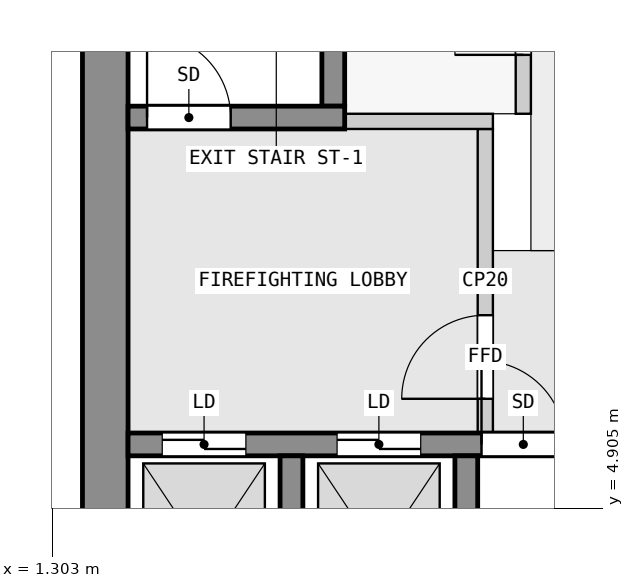
"""IFC4 building model, lengths in metres.
Left out: names, types, materials, properties, quantities, classifications, styles, units other than length and angle.
Written with IfcOpenShell. Run it as: python <this file> out.ifc"""

import sys

from ifc_helpers import new_model, si_unit, direction, frame, frame_2d, origin, place, context, subcontext, project, spatial, rectangle, extrude, element, fill, save


model = new_model("IFC4")
c1 = context("Model", 3, precision=1e-05, world=origin(), true_north=direction((0.0, 1.0)))
c2 = subcontext(c1, "Body", "Model", "MODEL_VIEW")
j1 = project(units=[si_unit("LENGTHUNIT", "METRE"), si_unit("PLANEANGLEUNIT", "RADIAN")], contexts=[c1])
p1 = place(None, origin())
s1 = spatial("IfcSite", under=j1, at=p1, CompositionType="ELEMENT")
p2 = place(p1, origin())
s2 = spatial("IfcBuilding", under=s1, at=p2, CompositionType="ELEMENT")
p3 = place(p2, frame((0.0, 0.0, 174.4)))
s3 = spatial("IfcBuildingStorey", under=s2, at=p3, CompositionType="ELEMENT", Elevation=174.4)
p4 = place(p3, frame((2.0, 2.5, 0.0), z_axis=(0.0, 0.0, 1.0), x_axis=(0.0, 1.0, 0.0)))
e1 = element("IfcWall", 1, at=p4, inside=s3, PredefinedType="SHEAR", context=c2, shape_type="SweptSolid", body=[
    extrude(rectangle(XDim=14.9, YDim=0.6, at=frame_2d((7.45, 0.0))), origin(), (0.0, 0.0, 1.0), 3.25),
])
for number, where, z_axis, x_axis in (
    (2, (4.45, 2.8, 0.0), (0.0, 0.0, 1.0), (0.0, 1.0, 0.0)),
    (3, (6.75, 2.8, 0.0), (0.0, 0.0, 1.0), (0.0, 1.0, 0.0)),
):
    element("IfcWall", number, at=place(p3, frame(where, z_axis=z_axis, x_axis=x_axis)), inside=s3, PredefinedType="SHEAR", context=c2, shape_type="SweptSolid", body=[
        extrude(rectangle(XDim=2.8, YDim=0.3, at=frame_2d((1.4, 0.0))), origin(), (0.0, 0.0, 1.0), 3.25),
    ])
p5 = place(p3, frame((2.3, 5.75, 0.0), z_axis=(0.0, 0.0, 1.0), x_axis=(1.0, 0.0, 0.0)))
e4 = element("IfcWall", 4, at=p5, inside=s3, PredefinedType="SHEAR", context=c2, shape_type="SweptSolid", body=[
    extrude(rectangle(XDim=18.8, YDim=0.3, at=frame_2d((9.4, 0.0))), origin(), (0.0, 0.0, 1.0), 3.25),
])
p6 = place(p5, frame((4.65, 0.0, 0.0)))
e5 = element("IfcOpeningElement", 5, at=p6, cuts=e4, PredefinedType="OPENING", context=c2, shape_type="SweptSolid", body=[
    extrude(rectangle(XDim=1.1, YDim=2.1, at=frame_2d((0.55, 1.05))), frame((0.0, 0.16, 0.0), z_axis=(0.0, -1.0, 0.0), x_axis=(1.0, 0.0, 0.0)), (0.0, 0.0, 1.0), 0.32),
])
p7 = place(p5, frame((0.45, 0.0, 0.0)))
e6 = element("IfcOpeningElement", 6, at=p7, cuts=e4, PredefinedType="OPENING", context=c2, shape_type="SweptSolid", body=[
    extrude(rectangle(XDim=1.1, YDim=2.1, at=frame_2d((0.55, 1.05))), frame((0.0, 0.16, 0.0), z_axis=(0.0, -1.0, 0.0), x_axis=(1.0, 0.0, 0.0)), (0.0, 0.0, 1.0), 0.32),
])
p8 = place(p5, frame((2.75, 0.0, 0.0)))
e7 = element("IfcOpeningElement", 7, at=p8, cuts=e4, PredefinedType="OPENING", context=c2, shape_type="SweptSolid", body=[
    extrude(rectangle(XDim=1.1, YDim=2.1, at=frame_2d((0.55, 1.05))), frame((0.0, 0.16, 0.0), z_axis=(0.0, -1.0, 0.0), x_axis=(1.0, 0.0, 0.0)), (0.0, 0.0, 1.0), 0.32),
])
p9 = place(p5, frame((13.2, 0.0, 0.0)))
e8 = element("IfcOpeningElement", 8, at=p9, cuts=e4, PredefinedType="OPENING", context=c2, shape_type="SweptSolid", body=[
    extrude(rectangle(XDim=0.9, YDim=2.1, at=frame_2d((0.45, 1.05))), frame((0.0, 0.16, 0.0), z_axis=(0.0, -1.0, 0.0), x_axis=(1.0, 0.0, 0.0)), (0.0, 0.0, 1.0), 0.32),
])
p10 = place(p5, frame((16.95, 0.0, 0.0)))
e9 = element("IfcOpeningElement", 9, at=p10, cuts=e4, PredefinedType="OPENING", context=c2, shape_type="SweptSolid", body=[
    extrude(rectangle(XDim=0.9, YDim=2.1, at=frame_2d((0.45, 1.05))), frame((0.0, 0.16, 0.0), z_axis=(0.0, -1.0, 0.0), x_axis=(1.0, 0.0, 0.0)), (0.0, 0.0, 1.0), 0.32),
])
p11 = place(p3, frame((2.3, 10.05, 0.0), z_axis=(0.0, 0.0, 1.0), x_axis=(1.0, 0.0, 0.0)))
e10 = element("IfcWall", 10, at=p11, inside=s3, PredefinedType="SHEAR", context=c2, shape_type="SweptSolid", body=[
    extrude(rectangle(XDim=2.85, YDim=0.3, at=frame_2d((1.425, 0.0))), origin(), (0.0, 0.0, 1.0), 3.25),
])
p12 = place(p11, frame((0.25, 0.0, 0.0)))
e11 = element("IfcOpeningElement", 11, at=p12, cuts=e10, PredefinedType="OPENING", context=c2, shape_type="SweptSolid", body=[
    extrude(rectangle(XDim=1.1, YDim=2.1, at=frame_2d((0.55, 1.05))), frame((0.0, 0.16, 0.0), z_axis=(0.0, -1.0, 0.0), x_axis=(1.0, 0.0, 0.0)), (0.0, 0.0, 1.0), 0.32),
])
p13 = place(p3, frame((5.0, 10.2, 0.0), z_axis=(0.0, 0.0, 1.0), x_axis=(0.0, 1.0, 0.0)))
e12 = element("IfcWall", 12, at=p13, inside=s3, PredefinedType="SHEAR", context=c2, shape_type="SweptSolid", body=[
    extrude(rectangle(XDim=6.4, YDim=0.3, at=frame_2d((3.2, 0.0))), origin(), (0.0, 0.0, 1.0), 3.25),
])
p14 = place(p3, frame((7.0, 5.9, 0.0), z_axis=(0.0, 0.0, 1.0), x_axis=(0.0, 1.0, 0.0)))
e13 = element("IfcWall", 13, at=p14, inside=s3, PredefinedType="PARTITIONING", context=c2, shape_type="SweptSolid", body=[
    extrude(rectangle(XDim=4.0, YDim=0.2, at=frame_2d((2.0, 0.0))), origin(), (0.0, 0.0, 1.0), 3.25),
])
p15 = place(p14, frame((0.45, 0.0, 0.0)))
e14 = element("IfcOpeningElement", 14, at=p15, cuts=e13, PredefinedType="OPENING", context=c2, shape_type="SweptSolid", body=[
    extrude(rectangle(XDim=1.1, YDim=2.1, at=frame_2d((0.55, 1.05))), frame((0.0, 0.11, 0.0), z_axis=(0.0, -1.0, 0.0), x_axis=(1.0, 0.0, 0.0)), (0.0, 0.0, 1.0), 0.22),
])
p16 = place(p3, frame((5.15, 10.0, 0.0), z_axis=(0.0, 0.0, 1.0), x_axis=(1.0, 0.0, 0.0)))
e15 = element("IfcWall", 15, at=p16, inside=s3, PredefinedType="PARTITIONING", context=c2, shape_type="SweptSolid", body=[
    extrude(rectangle(XDim=1.95, YDim=0.2, at=frame_2d((0.975, 0.0))), origin(), (0.0, 0.0, 1.0), 3.25),
])
p17 = place(p3, frame((7.5, 10.1, 0.0), z_axis=(0.0, 0.0, 1.0), x_axis=(0.0, 1.0, 0.0)))
e16 = element("IfcWall", 16, at=p17, inside=s3, PredefinedType="PARTITIONING", context=c2, shape_type="SweptSolid", body=[
    extrude(rectangle(XDim=7.3, YDim=0.2, at=frame_2d((3.65, 0.0))), origin(), (0.0, 0.0, 1.0), 3.25),
])
p18 = place(p17, frame((0.775, 0.0, 0.0)))
e17 = element("IfcOpeningElement", 17, at=p18, cuts=e16, PredefinedType="OPENING", context=c2, shape_type="SweptSolid", body=[
    extrude(rectangle(XDim=0.9, YDim=2.1, at=frame_2d((0.45, 1.05))), frame((0.0, 0.11, 0.0), z_axis=(0.0, -1.0, 0.0), x_axis=(1.0, 0.0, 0.0)), (0.0, 0.0, 1.0), 0.22),
])
p19 = place(p17, frame((3.225, 0.0, 0.0)))
e18 = element("IfcOpeningElement", 18, at=p19, cuts=e16, PredefinedType="OPENING", context=c2, shape_type="SweptSolid", body=[
    extrude(rectangle(XDim=0.9, YDim=2.1, at=frame_2d((0.45, 1.05))), frame((0.0, 0.11, 0.0), z_axis=(0.0, -1.0, 0.0), x_axis=(1.0, 0.0, 0.0)), (0.0, 0.0, 1.0), 0.22),
])
p20 = place(p17, frame((5.25, 0.0, 0.0)))
e19 = element("IfcOpeningElement", 19, at=p20, cuts=e16, PredefinedType="OPENING", context=c2, shape_type="SweptSolid", body=[
    extrude(rectangle(XDim=0.9, YDim=2.1, at=frame_2d((0.45, 1.05))), frame((0.0, 0.11, 0.0), z_axis=(0.0, -1.0, 0.0), x_axis=(1.0, 0.0, 0.0)), (0.0, 0.0, 1.0), 0.22),
])
p21 = place(p15, origin())
e20 = element("IfcDoor", 20, at=p21, inside=s3, OperationType="SINGLE_SWING_LEFT", PredefinedType="DOOR", context=c2, shape_type="SweptSolid", body=[
    extrude(rectangle(XDim=1.1, YDim=2.1, at=frame_2d((0.55, 1.05))), frame((0.0, 0.025, 0.0), z_axis=(0.0, -1.0, 0.0), x_axis=(1.0, 0.0, 0.0)), (0.0, 0.0, 1.0), 0.05),
])
fill(e14, e20)
p22 = place(p12, origin())
e21 = element("IfcDoor", 21, at=p22, inside=s3, OperationType="SINGLE_SWING_RIGHT", PredefinedType="DOOR", context=c2, shape_type="SweptSolid", body=[
    extrude(rectangle(XDim=1.1, YDim=2.1, at=frame_2d((0.55, 1.05))), frame((0.0, 0.025, 0.0), z_axis=(0.0, -1.0, 0.0), x_axis=(1.0, 0.0, 0.0)), (0.0, 0.0, 1.0), 0.05),
])
fill(e11, e21)
p23 = place(p6, origin())
e22 = element("IfcDoor", 22, at=p23, inside=s3, OperationType="SINGLE_SWING_LEFT", PredefinedType="DOOR", context=c2, shape_type="SweptSolid", body=[
    extrude(rectangle(XDim=1.1, YDim=2.1, at=frame_2d((0.55, 1.05))), frame((0.0, 0.025, 0.0), z_axis=(0.0, -1.0, 0.0), x_axis=(1.0, 0.0, 0.0)), (0.0, 0.0, 1.0), 0.05),
])
fill(e5, e22)
p24 = place(p7, origin())
e23 = element("IfcDoor", 23, at=p24, inside=s3, OperationType="DOUBLE_DOOR_SLIDING", PredefinedType="DOOR", context=c2, shape_type="SweptSolid", body=[
    extrude(rectangle(XDim=1.1, YDim=2.1, at=frame_2d((0.55, 1.05))), frame((0.0, 0.025, 0.0), z_axis=(0.0, -1.0, 0.0), x_axis=(1.0, 0.0, 0.0)), (0.0, 0.0, 1.0), 0.05),
])
fill(e6, e23)
p25 = place(p8, origin())
e24 = element("IfcDoor", 24, at=p25, inside=s3, OperationType="DOUBLE_DOOR_SLIDING", PredefinedType="DOOR", context=c2, shape_type="SweptSolid", body=[
    extrude(rectangle(XDim=1.1, YDim=2.1, at=frame_2d((0.55, 1.05))), frame((0.0, 0.025, 0.0), z_axis=(0.0, -1.0, 0.0), x_axis=(1.0, 0.0, 0.0)), (0.0, 0.0, 1.0), 0.05),
])
fill(e7, e24)
p26 = place(p18, origin())
e25 = element("IfcDoor", 25, at=p26, inside=s3, OperationType="SINGLE_SWING_RIGHT", PredefinedType="DOOR", context=c2, shape_type="SweptSolid", body=[
    extrude(rectangle(XDim=0.9, YDim=2.1, at=frame_2d((0.45, 1.05))), frame((0.0, 0.025, 0.0), z_axis=(0.0, -1.0, 0.0), x_axis=(1.0, 0.0, 0.0)), (0.0, 0.0, 1.0), 0.05),
])
fill(e17, e25)
save(model, sys.argv[1])
